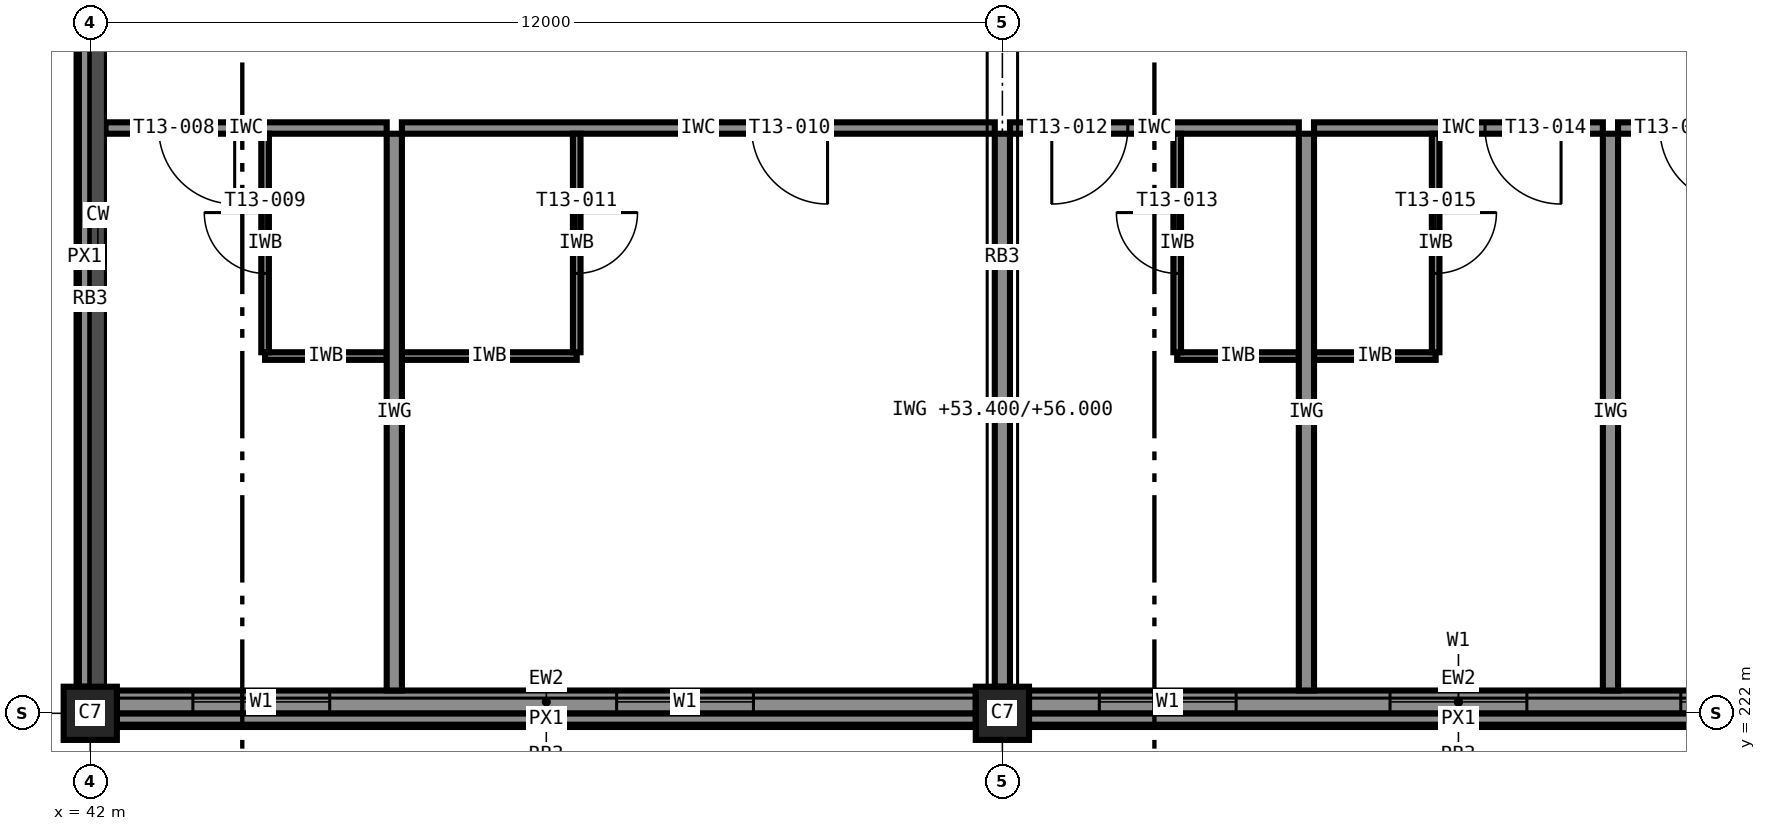
"""IFC4 building model, lengths in metres.
Left out: names, types, materials, properties, quantities, classifications, styles, units other than length and angle.
Written with IfcOpenShell. Run it as: python <this file> out.ifc"""

import sys

from ifc_helpers import new_model, si_unit, direction, frame, frame_2d, origin, origin_2d, place, context, subcontext, project, spatial, rectangle, extrude, element, fill, save


model = new_model("IFC4")
c1 = context("Model", 3, precision=1e-05, world=origin(), true_north=direction((0.0, 1.0)))
c2 = subcontext(c1, "Body", "Model", "MODEL_VIEW")
j1 = project(units=[si_unit("LENGTHUNIT", "METRE"), si_unit("PLANEANGLEUNIT", "RADIAN")], contexts=[c1])
p1 = place(None, origin())
s1 = spatial("IfcSite", under=j1, at=p1, CompositionType="ELEMENT")
p2 = place(p1, origin())
s2 = spatial("IfcBuilding", under=s1, at=p2, CompositionType="ELEMENT")
p3 = place(p2, frame((0.0, 0.0, 53.4)))
s3 = spatial("IfcBuildingStorey", under=s2, at=p3, CompositionType="ELEMENT", Elevation=53.4)
for number, where, z_axis, x_axis in (
    (1, (42.0, 222.0, 0.0), (0.0, 0.0, 1.0), (1.0, 0.0, 0.0)),
    (2, (54.0, 222.0, 0.0), (0.0, 0.0, 1.0), (1.0, 0.0, 0.0)),
):
    element("IfcColumn", number, at=place(p3, frame(where, z_axis=z_axis, x_axis=x_axis)), inside=s3, PredefinedType="COLUMN", context=c2, shape_type="SweptSolid", body=[
        extrude(rectangle(XDim=0.7, YDim=0.7, at=origin_2d()), origin(), (0.0, 0.0, 1.0), 3.6),
    ])
p4 = place(p3, frame((42.35, 222.15, 0.0), z_axis=(0.0, 0.0, 1.0), x_axis=(1.0, 0.0, 0.0)))
e3 = element("IfcWall", 3, at=p4, inside=s3, PredefinedType="STANDARD", context=c2, shape_type="SweptSolid", body=[
    extrude(rectangle(XDim=11.3, YDim=0.3, at=frame_2d((5.65, 0.0))), origin(), (0.0, 0.0, 1.0), 2.6),
])
p5 = place(p4, frame((1.0, 0.0, 0.85)))
e4 = element("IfcOpeningElement", 4, at=p5, cuts=e3, PredefinedType="OPENING", context=c2, shape_type="SweptSolid", body=[
    extrude(rectangle(XDim=1.8, YDim=1.75, at=frame_2d((0.9, 0.875))), frame((0.0, 0.16, 0.0), z_axis=(0.0, -1.0, 0.0), x_axis=(1.0, 0.0, 0.0)), (0.0, 0.0, 1.0), 0.32),
])
p6 = place(p4, frame((6.575, 0.0, 0.85)))
e5 = element("IfcOpeningElement", 5, at=p6, cuts=e3, PredefinedType="OPENING", context=c2, shape_type="SweptSolid", body=[
    extrude(rectangle(XDim=1.8, YDim=1.75, at=frame_2d((0.9, 0.875))), frame((0.0, 0.16, 0.0), z_axis=(0.0, -1.0, 0.0), x_axis=(1.0, 0.0, 0.0)), (0.0, 0.0, 1.0), 0.32),
])
p7 = place(p3, frame((54.35, 222.15, 0.0), z_axis=(0.0, 0.0, 1.0), x_axis=(1.0, 0.0, 0.0)))
e6 = element("IfcWall", 6, at=p7, inside=s3, PredefinedType="STANDARD", context=c2, shape_type="SweptSolid", body=[
    extrude(rectangle(XDim=11.3, YDim=0.3, at=frame_2d((5.65, 0.0))), origin(), (0.0, 0.0, 1.0), 2.6),
])
p8 = place(p7, frame((0.925, 0.0, 0.85)))
e7 = element("IfcOpeningElement", 7, at=p8, cuts=e6, PredefinedType="OPENING", context=c2, shape_type="SweptSolid", body=[
    extrude(rectangle(XDim=1.8, YDim=1.75, at=frame_2d((0.9, 0.875))), frame((0.0, 0.16, 0.0), z_axis=(0.0, -1.0, 0.0), x_axis=(1.0, 0.0, 0.0)), (0.0, 0.0, 1.0), 0.32),
])
p9 = place(p7, frame((4.75, 0.0, 0.85)))
e8 = element("IfcOpeningElement", 8, at=p9, cuts=e6, PredefinedType="OPENING", context=c2, shape_type="SweptSolid", body=[
    extrude(rectangle(XDim=1.8, YDim=1.75, at=frame_2d((0.9, 0.875))), frame((0.0, 0.16, 0.0), z_axis=(0.0, -1.0, 0.0), x_axis=(1.0, 0.0, 0.0)), (0.0, 0.0, 1.0), 0.32),
])
p10 = place(p7, frame((8.575, 0.0, 0.85)))
e9 = element("IfcOpeningElement", 9, at=p10, cuts=e6, PredefinedType="OPENING", context=c2, shape_type="SweptSolid", body=[
    extrude(rectangle(XDim=1.8, YDim=1.75, at=frame_2d((0.9, 0.875))), frame((0.0, 0.16, 0.0), z_axis=(0.0, -1.0, 0.0), x_axis=(1.0, 0.0, 0.0)), (0.0, 0.0, 1.0), 0.32),
])
for number, where, z_axis, x_axis in (
    (10, (42.35, 221.925, 3.4), (0.0, 0.0, 1.0), (1.0, 0.0, 0.0)),
    (11, (54.35, 221.925, 3.4), (0.0, 0.0, 1.0), (1.0, 0.0, 0.0)),
    (12, (41.925, 233.65, 3.4), (0.0, 0.0, 1.0), (0.0, -1.0, 0.0)),
):
    element("IfcWall", number, at=place(p3, frame(where, z_axis=z_axis, x_axis=x_axis)), inside=s3, PredefinedType="STANDARD", context=c2, shape_type="SweptSolid", body=[
        extrude(rectangle(XDim=11.3, YDim=0.15, at=frame_2d((5.65, 0.0))), origin(), (0.0, 0.0, 1.0), 0.2),
    ])
p11 = place(p3, frame((45.9, 229.7, 0.0), z_axis=(0.0, 0.0, 1.0), x_axis=(-1.0, 0.0, 0.0)))
e13 = element("IfcWall", 13, at=p11, inside=s3, PredefinedType="PARTITIONING", context=c2, shape_type="SweptSolid", body=[
    extrude(rectangle(XDim=3.7, YDim=0.15, at=frame_2d((1.85, 0.0))), origin(), (0.0, 0.0, 1.0), 3.4),
])
p12 = place(p11, frame((2.0, 0.0, 0.0)))
e14 = element("IfcOpeningElement", 14, at=p12, cuts=e13, PredefinedType="OPENING", context=c2, shape_type="SweptSolid", body=[
    extrude(rectangle(XDim=1.0, YDim=2.1, at=frame_2d((0.5, 1.05))), frame((0.0, 0.085, 0.0), z_axis=(0.0, -1.0, 0.0), x_axis=(1.0, 0.0, 0.0)), (0.0, 0.0, 1.0), 0.17),
])
p13 = place(p3, frame((44.3, 226.7, 0.0), z_axis=(0.0, 0.0, 1.0), x_axis=(1.0, 0.0, 0.0)))
e15 = element("IfcWall", 15, at=p13, inside=s3, PredefinedType="PARTITIONING", context=c2, shape_type="SweptSolid", body=[
    extrude(rectangle(XDim=1.6, YDim=0.1, at=frame_2d((0.8, 0.0))), origin(), (0.0, 0.0, 1.0), 3.4),
])
p14 = place(p3, frame((44.3, 226.75, 0.0), z_axis=(0.0, 0.0, 1.0), x_axis=(0.0, 1.0, 0.0)))
e16 = element("IfcWall", 16, at=p14, inside=s3, PredefinedType="PARTITIONING", context=c2, shape_type="SweptSolid", body=[
    extrude(rectangle(XDim=2.875, YDim=0.1, at=frame_2d((1.438, 0.0))), origin(), (0.0, 0.0, 1.0), 3.4),
])
p15 = place(p14, frame((1.038, 0.0, 0.0)))
e17 = element("IfcOpeningElement", 17, at=p15, cuts=e16, PredefinedType="OPENING", context=c2, shape_type="SweptSolid", body=[
    extrude(rectangle(XDim=0.8, YDim=2.1, at=frame_2d((0.4, 1.05))), frame((0.0, 0.06, 0.0), z_axis=(0.0, -1.0, 0.0), x_axis=(1.0, 0.0, 0.0)), (0.0, 0.0, 1.0), 0.12),
])
p16 = place(p3, frame((53.9, 229.7, 0.0), z_axis=(0.0, 0.0, 1.0), x_axis=(-1.0, 0.0, 0.0)))
e18 = element("IfcWall", 18, at=p16, inside=s3, PredefinedType="PARTITIONING", context=c2, shape_type="SweptSolid", body=[
    extrude(rectangle(XDim=7.8, YDim=0.15, at=frame_2d((3.9, 0.0))), origin(), (0.0, 0.0, 1.0), 3.4),
])
p17 = place(p16, frame((2.2, 0.0, 0.0)))
e19 = element("IfcOpeningElement", 19, at=p17, cuts=e18, PredefinedType="OPENING", context=c2, shape_type="SweptSolid", body=[
    extrude(rectangle(XDim=1.0, YDim=2.1, at=frame_2d((0.5, 1.05))), frame((0.0, 0.085, 0.0), z_axis=(0.0, -1.0, 0.0), x_axis=(1.0, 0.0, 0.0)), (0.0, 0.0, 1.0), 0.17),
])
p18 = place(p3, frame((46.1, 226.7, 0.0), z_axis=(0.0, 0.0, 1.0), x_axis=(1.0, 0.0, 0.0)))
e20 = element("IfcWall", 20, at=p18, inside=s3, PredefinedType="PARTITIONING", context=c2, shape_type="SweptSolid", body=[
    extrude(rectangle(XDim=2.3, YDim=0.1, at=frame_2d((1.15, 0.0))), origin(), (0.0, 0.0, 1.0), 3.4),
])
p19 = place(p3, frame((48.4, 229.625, 0.0), z_axis=(0.0, 0.0, 1.0), x_axis=(0.0, -1.0, 0.0)))
e21 = element("IfcWall", 21, at=p19, inside=s3, PredefinedType="PARTITIONING", context=c2, shape_type="SweptSolid", body=[
    extrude(rectangle(XDim=2.875, YDim=0.1, at=frame_2d((1.438, 0.0))), origin(), (0.0, 0.0, 1.0), 3.4),
])
p20 = place(p19, frame((1.038, 0.0, 0.0)))
e22 = element("IfcOpeningElement", 22, at=p20, cuts=e21, PredefinedType="OPENING", context=c2, shape_type="SweptSolid", body=[
    extrude(rectangle(XDim=0.8, YDim=2.1, at=frame_2d((0.4, 1.05))), frame((0.0, 0.06, 0.0), z_axis=(0.0, -1.0, 0.0), x_axis=(1.0, 0.0, 0.0)), (0.0, 0.0, 1.0), 0.12),
])
p21 = place(p3, frame((57.9, 229.7, 0.0), z_axis=(0.0, 0.0, 1.0), x_axis=(-1.0, 0.0, 0.0)))
e23 = element("IfcWall", 23, at=p21, inside=s3, PredefinedType="PARTITIONING", context=c2, shape_type="SweptSolid", body=[
    extrude(rectangle(XDim=3.8, YDim=0.15, at=frame_2d((1.9, 0.0))), origin(), (0.0, 0.0, 1.0), 3.4),
])
p22 = place(p21, frame((2.25, 0.0, 0.0)))
e24 = element("IfcOpeningElement", 24, at=p22, cuts=e23, PredefinedType="OPENING", context=c2, shape_type="SweptSolid", body=[
    extrude(rectangle(XDim=1.0, YDim=2.1, at=frame_2d((0.5, 1.05))), frame((0.0, 0.085, 0.0), z_axis=(0.0, -1.0, 0.0), x_axis=(1.0, 0.0, 0.0)), (0.0, 0.0, 1.0), 0.17),
])
p23 = place(p3, frame((56.3, 226.7, 0.0), z_axis=(0.0, 0.0, 1.0), x_axis=(1.0, 0.0, 0.0)))
e25 = element("IfcWall", 25, at=p23, inside=s3, PredefinedType="PARTITIONING", context=c2, shape_type="SweptSolid", body=[
    extrude(rectangle(XDim=1.6, YDim=0.1, at=frame_2d((0.8, 0.0))), origin(), (0.0, 0.0, 1.0), 3.4),
])
p24 = place(p3, frame((56.3, 226.75, 0.0), z_axis=(0.0, 0.0, 1.0), x_axis=(0.0, 1.0, 0.0)))
e26 = element("IfcWall", 26, at=p24, inside=s3, PredefinedType="PARTITIONING", context=c2, shape_type="SweptSolid", body=[
    extrude(rectangle(XDim=2.875, YDim=0.1, at=frame_2d((1.438, 0.0))), origin(), (0.0, 0.0, 1.0), 3.4),
])
p25 = place(p24, frame((1.038, 0.0, 0.0)))
e27 = element("IfcOpeningElement", 27, at=p25, cuts=e26, PredefinedType="OPENING", context=c2, shape_type="SweptSolid", body=[
    extrude(rectangle(XDim=0.8, YDim=2.1, at=frame_2d((0.4, 1.05))), frame((0.0, 0.06, 0.0), z_axis=(0.0, -1.0, 0.0), x_axis=(1.0, 0.0, 0.0)), (0.0, 0.0, 1.0), 0.12),
])
p26 = place(p3, frame((61.9, 229.7, 0.0), z_axis=(0.0, 0.0, 1.0), x_axis=(-1.0, 0.0, 0.0)))
e28 = element("IfcWall", 28, at=p26, inside=s3, PredefinedType="PARTITIONING", context=c2, shape_type="SweptSolid", body=[
    extrude(rectangle(XDim=3.8, YDim=0.15, at=frame_2d((1.9, 0.0))), origin(), (0.0, 0.0, 1.0), 3.4),
])
p27 = place(p26, frame((0.55, 0.0, 0.0)))
e29 = element("IfcOpeningElement", 29, at=p27, cuts=e28, PredefinedType="OPENING", context=c2, shape_type="SweptSolid", body=[
    extrude(rectangle(XDim=1.0, YDim=2.1, at=frame_2d((0.5, 1.05))), frame((0.0, 0.085, 0.0), z_axis=(0.0, -1.0, 0.0), x_axis=(1.0, 0.0, 0.0)), (0.0, 0.0, 1.0), 0.17),
])
p28 = place(p3, frame((58.1, 226.7, 0.0), z_axis=(0.0, 0.0, 1.0), x_axis=(1.0, 0.0, 0.0)))
e30 = element("IfcWall", 30, at=p28, inside=s3, PredefinedType="PARTITIONING", context=c2, shape_type="SweptSolid", body=[
    extrude(rectangle(XDim=1.6, YDim=0.1, at=frame_2d((0.8, 0.0))), origin(), (0.0, 0.0, 1.0), 3.4),
])
p29 = place(p3, frame((59.7, 229.625, 0.0), z_axis=(0.0, 0.0, 1.0), x_axis=(0.0, -1.0, 0.0)))
e31 = element("IfcWall", 31, at=p29, inside=s3, PredefinedType="PARTITIONING", context=c2, shape_type="SweptSolid", body=[
    extrude(rectangle(XDim=2.875, YDim=0.1, at=frame_2d((1.438, 0.0))), origin(), (0.0, 0.0, 1.0), 3.4),
])
p30 = place(p29, frame((1.038, 0.0, 0.0)))
e32 = element("IfcOpeningElement", 32, at=p30, cuts=e31, PredefinedType="OPENING", context=c2, shape_type="SweptSolid", body=[
    extrude(rectangle(XDim=0.8, YDim=2.1, at=frame_2d((0.4, 1.05))), frame((0.0, 0.06, 0.0), z_axis=(0.0, -1.0, 0.0), x_axis=(1.0, 0.0, 0.0)), (0.0, 0.0, 1.0), 0.12),
])
p31 = place(p3, frame((65.9, 229.7, 0.0), z_axis=(0.0, 0.0, 1.0), x_axis=(-1.0, 0.0, 0.0)))
e33 = element("IfcWall", 33, at=p31, inside=s3, PredefinedType="PARTITIONING", context=c2, shape_type="SweptSolid", body=[
    extrude(rectangle(XDim=3.8, YDim=0.15, at=frame_2d((1.9, 0.0))), origin(), (0.0, 0.0, 1.0), 3.4),
])
p32 = place(p31, frame((2.25, 0.0, 0.0)))
e34 = element("IfcOpeningElement", 34, at=p32, cuts=e33, PredefinedType="OPENING", context=c2, shape_type="SweptSolid", body=[
    extrude(rectangle(XDim=1.0, YDim=2.1, at=frame_2d((0.5, 1.05))), frame((0.0, 0.085, 0.0), z_axis=(0.0, -1.0, 0.0), x_axis=(1.0, 0.0, 0.0)), (0.0, 0.0, 1.0), 0.17),
])
p33 = place(p3, frame((46.0, 222.3, 0.0), z_axis=(0.0, 0.0, 1.0), x_axis=(0.0, 1.0, 0.0)))
e35 = element("IfcWall", 35, at=p33, inside=s3, PredefinedType="PARTITIONING", context=c2, shape_type="SweptSolid", body=[
    extrude(rectangle(XDim=7.325, YDim=0.2, at=frame_2d((3.663, 0.0))), origin(), (0.0, 0.0, 1.0), 3.4),
])
p34 = place(p3, frame((54.0, 222.35, 0.0), z_axis=(0.0, 0.0, 1.0), x_axis=(0.0, 1.0, 0.0)))
e36 = element("IfcWall", 36, at=p34, inside=s3, PredefinedType="PARTITIONING", context=c2, shape_type="SweptSolid", body=[
    extrude(rectangle(XDim=7.275, YDim=0.2, at=frame_2d((3.637, 0.0))), origin(), (0.0, 0.0, 1.0), 2.6),
])
for number, where, z_axis, x_axis in (
    (37, (58.0, 222.3, 0.0), (0.0, 0.0, 1.0), (0.0, 1.0, 0.0)),
    (38, (62.0, 222.3, 0.0), (0.0, 0.0, 1.0), (0.0, 1.0, 0.0)),
):
    element("IfcWall", number, at=place(p3, frame(where, z_axis=z_axis, x_axis=x_axis)), inside=s3, PredefinedType="PARTITIONING", context=c2, shape_type="SweptSolid", body=[
        extrude(rectangle(XDim=7.325, YDim=0.2, at=frame_2d((3.663, 0.0))), origin(), (0.0, 0.0, 1.0), 3.4),
    ])
p35 = place(p5, origin())
e39 = element("IfcWindow", 39, at=p35, inside=s3, PartitioningType="SINGLE_PANEL", PredefinedType="WINDOW", context=c2, shape_type="SweptSolid", body=[
    extrude(rectangle(XDim=1.8, YDim=1.75, at=frame_2d((0.9, 0.875))), frame((0.0, 0.03, 0.0), z_axis=(0.0, -1.0, 0.0), x_axis=(1.0, 0.0, 0.0)), (0.0, 0.0, 1.0), 0.06),
])
fill(e4, e39)
p36 = place(p6, origin())
e40 = element("IfcWindow", 40, at=p36, inside=s3, PartitioningType="SINGLE_PANEL", PredefinedType="WINDOW", context=c2, shape_type="SweptSolid", body=[
    extrude(rectangle(XDim=1.8, YDim=1.75, at=frame_2d((0.9, 0.875))), frame((0.0, 0.03, 0.0), z_axis=(0.0, -1.0, 0.0), x_axis=(1.0, 0.0, 0.0)), (0.0, 0.0, 1.0), 0.06),
])
fill(e5, e40)
p37 = place(p8, origin())
e41 = element("IfcWindow", 41, at=p37, inside=s3, PartitioningType="SINGLE_PANEL", PredefinedType="WINDOW", context=c2, shape_type="SweptSolid", body=[
    extrude(rectangle(XDim=1.8, YDim=1.75, at=frame_2d((0.9, 0.875))), frame((0.0, 0.03, 0.0), z_axis=(0.0, -1.0, 0.0), x_axis=(1.0, 0.0, 0.0)), (0.0, 0.0, 1.0), 0.06),
])
fill(e7, e41)
p38 = place(p9, origin())
e42 = element("IfcWindow", 42, at=p38, inside=s3, PartitioningType="SINGLE_PANEL", PredefinedType="WINDOW", context=c2, shape_type="SweptSolid", body=[
    extrude(rectangle(XDim=1.8, YDim=1.75, at=frame_2d((0.9, 0.875))), frame((0.0, 0.03, 0.0), z_axis=(0.0, -1.0, 0.0), x_axis=(1.0, 0.0, 0.0)), (0.0, 0.0, 1.0), 0.06),
])
fill(e8, e42)
p39 = place(p10, origin())
e43 = element("IfcWindow", 43, at=p39, inside=s3, PartitioningType="SINGLE_PANEL", PredefinedType="WINDOW", context=c2, shape_type="SweptSolid", body=[
    extrude(rectangle(XDim=1.8, YDim=1.75, at=frame_2d((0.9, 0.875))), frame((0.0, 0.03, 0.0), z_axis=(0.0, -1.0, 0.0), x_axis=(1.0, 0.0, 0.0)), (0.0, 0.0, 1.0), 0.06),
])
fill(e9, e43)
p40 = place(p12, origin())
e44 = element("IfcDoor", 44, at=p40, inside=s3, OperationType="SINGLE_SWING_LEFT", PredefinedType="DOOR", context=c2, shape_type="SweptSolid", body=[
    extrude(rectangle(XDim=1.0, YDim=2.1, at=frame_2d((0.5, 1.05))), frame((0.0, 0.025, 0.0), z_axis=(0.0, -1.0, 0.0), x_axis=(1.0, 0.0, 0.0)), (0.0, 0.0, 1.0), 0.05),
])
fill(e14, e44)
p41 = place(p15, origin())
e45 = element("IfcDoor", 45, at=p41, inside=s3, OperationType="SINGLE_SWING_RIGHT", PredefinedType="DOOR", context=c2, shape_type="SweptSolid", body=[
    extrude(rectangle(XDim=0.8, YDim=2.1, at=frame_2d((0.4, 1.05))), frame((0.0, 0.025, 0.0), z_axis=(0.0, -1.0, 0.0), x_axis=(1.0, 0.0, 0.0)), (0.0, 0.0, 1.0), 0.05),
])
fill(e17, e45)
p42 = place(p17, origin())
e46 = element("IfcDoor", 46, at=p42, inside=s3, OperationType="SINGLE_SWING_LEFT", PredefinedType="DOOR", context=c2, shape_type="SweptSolid", body=[
    extrude(rectangle(XDim=1.0, YDim=2.1, at=frame_2d((0.5, 1.05))), frame((0.0, 0.025, 0.0), z_axis=(0.0, -1.0, 0.0), x_axis=(1.0, 0.0, 0.0)), (0.0, 0.0, 1.0), 0.05),
])
fill(e19, e46)
p43 = place(p20, origin())
e47 = element("IfcDoor", 47, at=p43, inside=s3, OperationType="SINGLE_SWING_LEFT", PredefinedType="DOOR", context=c2, shape_type="SweptSolid", body=[
    extrude(rectangle(XDim=0.8, YDim=2.1, at=frame_2d((0.4, 1.05))), frame((0.0, 0.025, 0.0), z_axis=(0.0, -1.0, 0.0), x_axis=(1.0, 0.0, 0.0)), (0.0, 0.0, 1.0), 0.05),
])
fill(e22, e47)
p44 = place(p22, origin())
e48 = element("IfcDoor", 48, at=p44, inside=s3, OperationType="SINGLE_SWING_RIGHT", PredefinedType="DOOR", context=c2, shape_type="SweptSolid", body=[
    extrude(rectangle(XDim=1.0, YDim=2.1, at=frame_2d((0.5, 1.05))), frame((0.0, 0.025, 0.0), z_axis=(0.0, -1.0, 0.0), x_axis=(1.0, 0.0, 0.0)), (0.0, 0.0, 1.0), 0.05),
])
fill(e24, e48)
p45 = place(p25, origin())
e49 = element("IfcDoor", 49, at=p45, inside=s3, OperationType="SINGLE_SWING_RIGHT", PredefinedType="DOOR", context=c2, shape_type="SweptSolid", body=[
    extrude(rectangle(XDim=0.8, YDim=2.1, at=frame_2d((0.4, 1.05))), frame((0.0, 0.025, 0.0), z_axis=(0.0, -1.0, 0.0), x_axis=(1.0, 0.0, 0.0)), (0.0, 0.0, 1.0), 0.05),
])
fill(e27, e49)
p46 = place(p27, origin())
e50 = element("IfcDoor", 50, at=p46, inside=s3, OperationType="SINGLE_SWING_LEFT", PredefinedType="DOOR", context=c2, shape_type="SweptSolid", body=[
    extrude(rectangle(XDim=1.0, YDim=2.1, at=frame_2d((0.5, 1.05))), frame((0.0, 0.025, 0.0), z_axis=(0.0, -1.0, 0.0), x_axis=(1.0, 0.0, 0.0)), (0.0, 0.0, 1.0), 0.05),
])
fill(e29, e50)
p47 = place(p30, origin())
e51 = element("IfcDoor", 51, at=p47, inside=s3, OperationType="SINGLE_SWING_LEFT", PredefinedType="DOOR", context=c2, shape_type="SweptSolid", body=[
    extrude(rectangle(XDim=0.8, YDim=2.1, at=frame_2d((0.4, 1.05))), frame((0.0, 0.025, 0.0), z_axis=(0.0, -1.0, 0.0), x_axis=(1.0, 0.0, 0.0)), (0.0, 0.0, 1.0), 0.05),
])
fill(e32, e51)
p48 = place(p32, origin())
e52 = element("IfcDoor", 52, at=p48, inside=s3, OperationType="SINGLE_SWING_LEFT", PredefinedType="DOOR", context=c2, shape_type="SweptSolid", body=[
    extrude(rectangle(XDim=1.0, YDim=2.1, at=frame_2d((0.5, 1.05))), frame((0.0, 0.025, 0.0), z_axis=(0.0, -1.0, 0.0), x_axis=(1.0, 0.0, 0.0)), (0.0, 0.0, 1.0), 0.05),
])
fill(e34, e52)
save(model, sys.argv[1])
